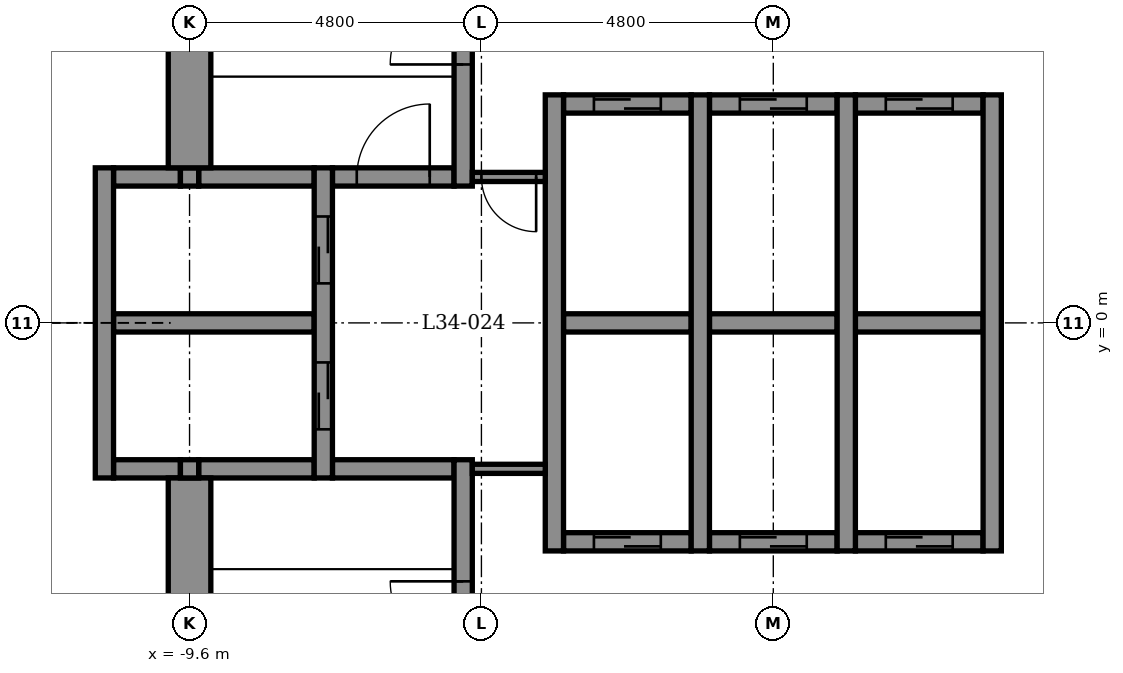
"""IFC4 building model, lengths in metres.
Left out: names, types, materials, properties, quantities, classifications, styles, units other than length and angle.
Written with IfcOpenShell. Run it as: python <this file> out.ifc"""

import sys

from ifc_helpers import new_model, si_unit, direction, frame, frame_2d, origin, place, context, subcontext, project, spatial, rectangle, extrude, element, fill, save


model = new_model("IFC4")
c1 = context("Model", 3, precision=1e-05, world=origin(), true_north=direction((0.0, 1.0)))
c2 = subcontext(c1, "Body", "Model", "MODEL_VIEW")
j1 = project(units=[si_unit("LENGTHUNIT", "METRE"), si_unit("PLANEANGLEUNIT", "RADIAN")], contexts=[c1])
p1 = place(None, origin())
s1 = spatial("IfcSite", under=j1, at=p1, CompositionType="ELEMENT")
p2 = place(p1, origin())
s2 = spatial("IfcBuilding", under=s1, at=p2, CompositionType="ELEMENT")
p3 = place(p2, frame((0.0, 0.0, 166.1)))
s3 = spatial("IfcBuildingStorey", under=s2, at=p3, CompositionType="ELEMENT", Elevation=166.1)
p4 = place(p3, frame((-3.45, -3.6, -0.15), z_axis=(0.0, 0.0, 1.0), x_axis=(1.0, 0.0, 0.0)))
e1 = element("IfcWall", 1, at=p4, inside=s3, PredefinedType="STANDARD", context=c2, shape_type="SweptSolid", body=[
    extrude(rectangle(XDim=2.1, YDim=0.3, at=frame_2d((1.05, 0.0))), origin(), (0.0, 0.0, 1.0), 3.9),
])
p5 = place(p4, frame((0.5, 0.0, 0.15)))
e2 = element("IfcOpeningElement", 2, at=p5, cuts=e1, PredefinedType="OPENING", context=c2, shape_type="SweptSolid", body=[
    extrude(rectangle(XDim=1.1, YDim=2.1, at=frame_2d((0.55, 1.05))), frame((0.0, 0.16, 0.0), z_axis=(0.0, -1.0, 0.0), x_axis=(1.0, 0.0, 0.0)), (0.0, 0.0, 1.0), 0.32),
])
p6 = place(p3, frame((-1.05, -3.6, -0.15), z_axis=(0.0, 0.0, 1.0), x_axis=(1.0, 0.0, 0.0)))
e3 = element("IfcWall", 3, at=p6, inside=s3, PredefinedType="STANDARD", context=c2, shape_type="SweptSolid", body=[
    extrude(rectangle(XDim=2.1, YDim=0.3, at=frame_2d((1.05, 0.0))), origin(), (0.0, 0.0, 1.0), 3.9),
])
p7 = place(p6, frame((0.5, 0.0, 0.15)))
e4 = element("IfcOpeningElement", 4, at=p7, cuts=e3, PredefinedType="OPENING", context=c2, shape_type="SweptSolid", body=[
    extrude(rectangle(XDim=1.1, YDim=2.1, at=frame_2d((0.55, 1.05))), frame((0.0, 0.16, 0.0), z_axis=(0.0, -1.0, 0.0), x_axis=(1.0, 0.0, 0.0)), (0.0, 0.0, 1.0), 0.32),
])
p8 = place(p3, frame((1.35, -3.6, -0.15), z_axis=(0.0, 0.0, 1.0), x_axis=(1.0, 0.0, 0.0)))
e5 = element("IfcWall", 5, at=p8, inside=s3, PredefinedType="STANDARD", context=c2, shape_type="SweptSolid", body=[
    extrude(rectangle(XDim=2.1, YDim=0.3, at=frame_2d((1.05, 0.0))), origin(), (0.0, 0.0, 1.0), 3.9),
])
p9 = place(p8, frame((0.5, 0.0, 0.15)))
e6 = element("IfcOpeningElement", 6, at=p9, cuts=e5, PredefinedType="OPENING", context=c2, shape_type="SweptSolid", body=[
    extrude(rectangle(XDim=1.1, YDim=2.1, at=frame_2d((0.55, 1.05))), frame((0.0, 0.16, 0.0), z_axis=(0.0, -1.0, 0.0), x_axis=(1.0, 0.0, 0.0)), (0.0, 0.0, 1.0), 0.32),
])
p10 = place(p3, frame((-10.85, -2.4, -0.15), z_axis=(0.0, 0.0, 1.0), x_axis=(1.0, 0.0, 0.0)))
e7 = element("IfcWall", 7, at=p10, inside=s3, PredefinedType="STANDARD", context=c2, shape_type="SweptSolid", body=[
    extrude(rectangle(XDim=1.1, YDim=0.3, at=frame_2d((0.55, 0.0))), origin(), (0.0, 0.0, 1.0), 3.9),
])
p11 = place(p3, frame((-9.45, -2.4, -0.15), z_axis=(0.0, 0.0, 1.0), x_axis=(1.0, 0.0, 0.0)))
e8 = element("IfcWall", 8, at=p11, inside=s3, PredefinedType="STANDARD", context=c2, shape_type="SweptSolid", body=[
    extrude(rectangle(XDim=1.9, YDim=0.3, at=frame_2d((0.95, 0.0))), origin(), (0.0, 0.0, 1.0), 3.9),
])
p12 = place(p3, frame((-7.25, -2.4, -0.15), z_axis=(0.0, 0.0, 1.0), x_axis=(1.0, 0.0, 0.0)))
e9 = element("IfcWall", 9, at=p12, inside=s3, PredefinedType="STANDARD", context=c2, shape_type="SweptSolid", body=[
    extrude(rectangle(XDim=2.0, YDim=0.3, at=frame_2d((1.0, 0.0))), origin(), (0.0, 0.0, 1.0), 3.9),
])
p13 = place(p3, frame((-10.85, 0.0, -0.15), z_axis=(0.0, 0.0, 1.0), x_axis=(1.0, 0.0, 0.0)))
e10 = element("IfcWall", 10, at=p13, inside=s3, PredefinedType="STANDARD", context=c2, shape_type="SweptSolid", body=[
    extrude(rectangle(XDim=3.3, YDim=0.3, at=frame_2d((1.65, 0.0))), origin(), (0.0, 0.0, 1.0), 3.9),
])
p14 = place(p3, frame((-3.45, 0.0, -0.15), z_axis=(0.0, 0.0, 1.0), x_axis=(1.0, 0.0, 0.0)))
e11 = element("IfcWall", 11, at=p14, inside=s3, PredefinedType="STANDARD", context=c2, shape_type="SweptSolid", body=[
    extrude(rectangle(XDim=2.1, YDim=0.3, at=frame_2d((1.05, 0.0))), origin(), (0.0, 0.0, 1.0), 3.9),
])
p15 = place(p3, frame((-1.05, 0.0, -0.15), z_axis=(0.0, 0.0, 1.0), x_axis=(1.0, 0.0, 0.0)))
e12 = element("IfcWall", 12, at=p15, inside=s3, PredefinedType="STANDARD", context=c2, shape_type="SweptSolid", body=[
    extrude(rectangle(XDim=2.1, YDim=0.3, at=frame_2d((1.05, 0.0))), origin(), (0.0, 0.0, 1.0), 3.9),
])
p16 = place(p3, frame((1.35, 0.0, -0.15), z_axis=(0.0, 0.0, 1.0), x_axis=(1.0, 0.0, 0.0)))
e13 = element("IfcWall", 13, at=p16, inside=s3, PredefinedType="STANDARD", context=c2, shape_type="SweptSolid", body=[
    extrude(rectangle(XDim=2.1, YDim=0.3, at=frame_2d((1.05, 0.0))), origin(), (0.0, 0.0, 1.0), 3.9),
])
p17 = place(p3, frame((-10.85, 2.4, -0.15), z_axis=(0.0, 0.0, 1.0), x_axis=(1.0, 0.0, 0.0)))
e14 = element("IfcWall", 14, at=p17, inside=s3, PredefinedType="STANDARD", context=c2, shape_type="SweptSolid", body=[
    extrude(rectangle(XDim=1.1, YDim=0.3, at=frame_2d((0.55, 0.0))), origin(), (0.0, 0.0, 1.0), 3.9),
])
p18 = place(p3, frame((-9.45, 2.4, -0.15), z_axis=(0.0, 0.0, 1.0), x_axis=(1.0, 0.0, 0.0)))
e15 = element("IfcWall", 15, at=p18, inside=s3, PredefinedType="STANDARD", context=c2, shape_type="SweptSolid", body=[
    extrude(rectangle(XDim=1.9, YDim=0.3, at=frame_2d((0.95, 0.0))), origin(), (0.0, 0.0, 1.0), 3.9),
])
p19 = place(p3, frame((-7.25, 2.4, -0.15), z_axis=(0.0, 0.0, 1.0), x_axis=(1.0, 0.0, 0.0)))
e16 = element("IfcWall", 16, at=p19, inside=s3, PredefinedType="STANDARD", context=c2, shape_type="SweptSolid", body=[
    extrude(rectangle(XDim=2.0, YDim=0.3, at=frame_2d((1.0, 0.0))), origin(), (0.0, 0.0, 1.0), 3.9),
])
p20 = place(p19, frame((0.4, 0.0, 0.15)))
e17 = element("IfcOpeningElement", 17, at=p20, cuts=e16, PredefinedType="OPENING", context=c2, shape_type="SweptSolid", body=[
    extrude(rectangle(XDim=1.2, YDim=2.1, at=frame_2d((0.6, 1.05))), frame((0.0, 0.16, 0.0), z_axis=(0.0, -1.0, 0.0), x_axis=(1.0, 0.0, 0.0)), (0.0, 0.0, 1.0), 0.32),
])
p21 = place(p3, frame((-3.45, 3.6, -0.15), z_axis=(0.0, 0.0, 1.0), x_axis=(1.0, 0.0, 0.0)))
e18 = element("IfcWall", 18, at=p21, inside=s3, PredefinedType="STANDARD", context=c2, shape_type="SweptSolid", body=[
    extrude(rectangle(XDim=2.1, YDim=0.3, at=frame_2d((1.05, 0.0))), origin(), (0.0, 0.0, 1.0), 3.9),
])
p22 = place(p21, frame((0.5, 0.0, 0.15)))
e19 = element("IfcOpeningElement", 19, at=p22, cuts=e18, PredefinedType="OPENING", context=c2, shape_type="SweptSolid", body=[
    extrude(rectangle(XDim=1.1, YDim=2.1, at=frame_2d((0.55, 1.05))), frame((0.0, 0.16, 0.0), z_axis=(0.0, -1.0, 0.0), x_axis=(1.0, 0.0, 0.0)), (0.0, 0.0, 1.0), 0.32),
])
p23 = place(p3, frame((-1.05, 3.6, -0.15), z_axis=(0.0, 0.0, 1.0), x_axis=(1.0, 0.0, 0.0)))
e20 = element("IfcWall", 20, at=p23, inside=s3, PredefinedType="STANDARD", context=c2, shape_type="SweptSolid", body=[
    extrude(rectangle(XDim=2.1, YDim=0.3, at=frame_2d((1.05, 0.0))), origin(), (0.0, 0.0, 1.0), 3.9),
])
p24 = place(p23, frame((0.5, 0.0, 0.15)))
e21 = element("IfcOpeningElement", 21, at=p24, cuts=e20, PredefinedType="OPENING", context=c2, shape_type="SweptSolid", body=[
    extrude(rectangle(XDim=1.1, YDim=2.1, at=frame_2d((0.55, 1.05))), frame((0.0, 0.16, 0.0), z_axis=(0.0, -1.0, 0.0), x_axis=(1.0, 0.0, 0.0)), (0.0, 0.0, 1.0), 0.32),
])
p25 = place(p3, frame((1.35, 3.6, -0.15), z_axis=(0.0, 0.0, 1.0), x_axis=(1.0, 0.0, 0.0)))
e22 = element("IfcWall", 22, at=p25, inside=s3, PredefinedType="STANDARD", context=c2, shape_type="SweptSolid", body=[
    extrude(rectangle(XDim=2.1, YDim=0.3, at=frame_2d((1.05, 0.0))), origin(), (0.0, 0.0, 1.0), 3.9),
])
p26 = place(p25, frame((0.5, 0.0, 0.15)))
e23 = element("IfcOpeningElement", 23, at=p26, cuts=e22, PredefinedType="OPENING", context=c2, shape_type="SweptSolid", body=[
    extrude(rectangle(XDim=1.1, YDim=2.1, at=frame_2d((0.55, 1.05))), frame((0.0, 0.16, 0.0), z_axis=(0.0, -1.0, 0.0), x_axis=(1.0, 0.0, 0.0)), (0.0, 0.0, 1.0), 0.32),
])
p27 = place(p3, frame((-11.0, -2.55, -0.15), z_axis=(0.0, 0.0, 1.0), x_axis=(0.0, 1.0, 0.0)))
e24 = element("IfcWall", 24, at=p27, inside=s3, PredefinedType="STANDARD", context=c2, shape_type="SweptSolid", body=[
    extrude(rectangle(XDim=5.1, YDim=0.3, at=frame_2d((2.55, 0.0))), origin(), (0.0, 0.0, 1.0), 3.9),
])
p28 = place(p3, frame((-9.6, -10.15, -0.15), z_axis=(0.0, 0.0, 1.0), x_axis=(0.0, 1.0, 0.0)))
e25 = element("IfcWall", 25, at=p28, inside=s3, PredefinedType="SHEAR", context=c2, shape_type="SweptSolid", body=[
    extrude(rectangle(XDim=7.6, YDim=0.7, at=frame_2d((3.8, 0.0))), origin(), (0.0, 0.0, 1.0), 3.9),
])
for number, where, z_axis, x_axis in (
    (26, (-9.6, -2.55, -0.15), (0.0, 0.0, 1.0), (0.0, 1.0, 0.0)),
    (27, (-9.6, 2.25, -0.15), (0.0, 0.0, 1.0), (0.0, 1.0, 0.0)),
):
    element("IfcWall", number, at=place(p3, frame(where, z_axis=z_axis, x_axis=x_axis)), inside=s3, PredefinedType="STANDARD", context=c2, shape_type="SweptSolid", body=[
        extrude(rectangle(XDim=0.3, YDim=0.3, at=frame_2d((0.15, 0.0))), origin(), (0.0, 0.0, 1.0), 3.9),
    ])
p29 = place(p3, frame((-9.6, 2.55, -0.15), z_axis=(0.0, 0.0, 1.0), x_axis=(0.0, 1.0, 0.0)))
e28 = element("IfcWall", 28, at=p29, inside=s3, PredefinedType="SHEAR", context=c2, shape_type="SweptSolid", body=[
    extrude(rectangle(XDim=7.6, YDim=0.7, at=frame_2d((3.8, 0.0))), origin(), (0.0, 0.0, 1.0), 3.9),
])
p30 = place(p3, frame((-7.4, -2.55, -0.15), z_axis=(0.0, 0.0, 1.0), x_axis=(0.0, 1.0, 0.0)))
e29 = element("IfcWall", 29, at=p30, inside=s3, PredefinedType="STANDARD", context=c2, shape_type="SweptSolid", body=[
    extrude(rectangle(XDim=5.1, YDim=0.3, at=frame_2d((2.55, 0.0))), origin(), (0.0, 0.0, 1.0), 3.9),
])
p31 = place(p30, frame((0.8, 0.0, 0.15)))
e30 = element("IfcOpeningElement", 30, at=p31, cuts=e29, PredefinedType="OPENING", context=c2, shape_type="SweptSolid", body=[
    extrude(rectangle(XDim=1.1, YDim=2.1, at=frame_2d((0.55, 1.05))), frame((0.0, 0.16, 0.0), z_axis=(0.0, -1.0, 0.0), x_axis=(1.0, 0.0, 0.0)), (0.0, 0.0, 1.0), 0.32),
])
p32 = place(p30, frame((3.2, 0.0, 0.15)))
e31 = element("IfcOpeningElement", 31, at=p32, cuts=e29, PredefinedType="OPENING", context=c2, shape_type="SweptSolid", body=[
    extrude(rectangle(XDim=1.1, YDim=2.1, at=frame_2d((0.55, 1.05))), frame((0.0, 0.16, 0.0), z_axis=(0.0, -1.0, 0.0), x_axis=(1.0, 0.0, 0.0)), (0.0, 0.0, 1.0), 0.32),
])
p33 = place(p3, frame((-5.1, -9.25, -0.15), z_axis=(0.0, 0.0, 1.0), x_axis=(0.0, 1.0, 0.0)))
e32 = element("IfcWall", 32, at=p33, inside=s3, PredefinedType="STANDARD", context=c2, shape_type="SweptSolid", body=[
    extrude(rectangle(XDim=7.0, YDim=0.3, at=frame_2d((3.5, 0.0))), origin(), (0.0, 0.0, 1.0), 3.9),
])
p34 = place(p33, frame((3.8, 0.0, 0.15)))
e33 = element("IfcOpeningElement", 33, at=p34, cuts=e32, PredefinedType="OPENING", context=c2, shape_type="SweptSolid", body=[
    extrude(rectangle(XDim=1.2, YDim=2.1, at=frame_2d((0.6, 1.05))), frame((0.0, 0.16, 0.0), z_axis=(0.0, -1.0, 0.0), x_axis=(1.0, 0.0, 0.0)), (0.0, 0.0, 1.0), 0.32),
])
p35 = place(p3, frame((-5.1, 2.25, -0.15), z_axis=(0.0, 0.0, 1.0), x_axis=(0.0, 1.0, 0.0)))
e34 = element("IfcWall", 34, at=p35, inside=s3, PredefinedType="STANDARD", context=c2, shape_type="SweptSolid", body=[
    extrude(rectangle(XDim=7.0, YDim=0.3, at=frame_2d((3.5, 0.0))), origin(), (0.0, 0.0, 1.0), 3.9),
])
p36 = place(p35, frame((2.0, 0.0, 0.15)))
e35 = element("IfcOpeningElement", 35, at=p36, cuts=e34, PredefinedType="OPENING", context=c2, shape_type="SweptSolid", body=[
    extrude(rectangle(XDim=1.2, YDim=2.1, at=frame_2d((0.6, 1.05))), frame((0.0, 0.16, 0.0), z_axis=(0.0, -1.0, 0.0), x_axis=(1.0, 0.0, 0.0)), (0.0, 0.0, 1.0), 0.32),
])
for number, where, z_axis, x_axis in (
    (36, (-3.6, -3.75, -0.15), (0.0, 0.0, 1.0), (0.0, 1.0, 0.0)),
    (37, (-1.2, -3.75, -0.15), (0.0, 0.0, 1.0), (0.0, 1.0, 0.0)),
    (38, (1.2, -3.75, -0.15), (0.0, 0.0, 1.0), (0.0, 1.0, 0.0)),
    (39, (3.6, -3.75, -0.15), (0.0, 0.0, 1.0), (0.0, 1.0, 0.0)),
):
    element("IfcWall", number, at=place(p3, frame(where, z_axis=z_axis, x_axis=x_axis)), inside=s3, PredefinedType="STANDARD", context=c2, shape_type="SweptSolid", body=[
        extrude(rectangle(XDim=7.5, YDim=0.3, at=frame_2d((3.75, 0.0))), origin(), (0.0, 0.0, 1.0), 3.9),
    ])
p37 = place(p3, frame((-4.95, 2.4, 0.0), z_axis=(0.0, 0.0, 1.0), x_axis=(1.0, 0.0, 0.0)))
e40 = element("IfcWall", 40, at=p37, inside=s3, PredefinedType="PARTITIONING", context=c2, shape_type="SweptSolid", body=[
    extrude(rectangle(XDim=1.2, YDim=0.15, at=frame_2d((0.6, 0.0))), origin(), (0.0, 0.0, 1.0), 3.75),
])
p38 = place(p37, frame((0.15, 0.0, 0.0)))
e41 = element("IfcOpeningElement", 41, at=p38, cuts=e40, PredefinedType="OPENING", context=c2, shape_type="SweptSolid", body=[
    extrude(rectangle(XDim=0.9, YDim=2.1, at=frame_2d((0.45, 1.05))), frame((0.0, 0.085, 0.0), z_axis=(0.0, -1.0, 0.0), x_axis=(1.0, 0.0, 0.0)), (0.0, 0.0, 1.0), 0.17),
])
p39 = place(p3, frame((-4.95, -2.4, 0.0), z_axis=(0.0, 0.0, 1.0), x_axis=(1.0, 0.0, 0.0)))
e42 = element("IfcWall", 42, at=p39, inside=s3, PredefinedType="PARTITIONING", context=c2, shape_type="SweptSolid", body=[
    extrude(rectangle(XDim=1.2, YDim=0.15, at=frame_2d((0.6, 0.0))), origin(), (0.0, 0.0, 1.0), 3.75),
])
p40 = place(p31, origin())
e43 = element("IfcDoor", 43, at=p40, inside=s3, OperationType="DOUBLE_DOOR_SLIDING", PredefinedType="DOOR", context=c2, shape_type="SweptSolid", body=[
    extrude(rectangle(XDim=1.1, YDim=2.1, at=frame_2d((0.55, 1.05))), frame((0.0, 0.025, 0.0), z_axis=(0.0, -1.0, 0.0), x_axis=(1.0, 0.0, 0.0)), (0.0, 0.0, 1.0), 0.05),
])
fill(e30, e43)
p41 = place(p32, origin())
e44 = element("IfcDoor", 44, at=p41, inside=s3, OperationType="DOUBLE_DOOR_SLIDING", PredefinedType="DOOR", context=c2, shape_type="SweptSolid", body=[
    extrude(rectangle(XDim=1.1, YDim=2.1, at=frame_2d((0.55, 1.05))), frame((0.0, 0.025, 0.0), z_axis=(0.0, -1.0, 0.0), x_axis=(1.0, 0.0, 0.0)), (0.0, 0.0, 1.0), 0.05),
])
fill(e31, e44)
p42 = place(p22, origin())
e45 = element("IfcDoor", 45, at=p42, inside=s3, OperationType="DOUBLE_DOOR_SLIDING", PredefinedType="DOOR", context=c2, shape_type="SweptSolid", body=[
    extrude(rectangle(XDim=1.1, YDim=2.1, at=frame_2d((0.55, 1.05))), frame((0.0, 0.025, 0.0), z_axis=(0.0, -1.0, 0.0), x_axis=(1.0, 0.0, 0.0)), (0.0, 0.0, 1.0), 0.05),
])
fill(e19, e45)
p43 = place(p24, origin())
e46 = element("IfcDoor", 46, at=p43, inside=s3, OperationType="DOUBLE_DOOR_SLIDING", PredefinedType="DOOR", context=c2, shape_type="SweptSolid", body=[
    extrude(rectangle(XDim=1.1, YDim=2.1, at=frame_2d((0.55, 1.05))), frame((0.0, 0.025, 0.0), z_axis=(0.0, -1.0, 0.0), x_axis=(1.0, 0.0, 0.0)), (0.0, 0.0, 1.0), 0.05),
])
fill(e21, e46)
p44 = place(p26, origin())
e47 = element("IfcDoor", 47, at=p44, inside=s3, OperationType="DOUBLE_DOOR_SLIDING", PredefinedType="DOOR", context=c2, shape_type="SweptSolid", body=[
    extrude(rectangle(XDim=1.1, YDim=2.1, at=frame_2d((0.55, 1.05))), frame((0.0, 0.025, 0.0), z_axis=(0.0, -1.0, 0.0), x_axis=(1.0, 0.0, 0.0)), (0.0, 0.0, 1.0), 0.05),
])
fill(e23, e47)
p45 = place(p5, origin())
e48 = element("IfcDoor", 48, at=p45, inside=s3, OperationType="DOUBLE_DOOR_SLIDING", PredefinedType="DOOR", context=c2, shape_type="SweptSolid", body=[
    extrude(rectangle(XDim=1.1, YDim=2.1, at=frame_2d((0.55, 1.05))), frame((0.0, 0.025, 0.0), z_axis=(0.0, -1.0, 0.0), x_axis=(1.0, 0.0, 0.0)), (0.0, 0.0, 1.0), 0.05),
])
fill(e2, e48)
p46 = place(p7, origin())
e49 = element("IfcDoor", 49, at=p46, inside=s3, OperationType="DOUBLE_DOOR_SLIDING", PredefinedType="DOOR", context=c2, shape_type="SweptSolid", body=[
    extrude(rectangle(XDim=1.1, YDim=2.1, at=frame_2d((0.55, 1.05))), frame((0.0, 0.025, 0.0), z_axis=(0.0, -1.0, 0.0), x_axis=(1.0, 0.0, 0.0)), (0.0, 0.0, 1.0), 0.05),
])
fill(e4, e49)
p47 = place(p9, origin())
e50 = element("IfcDoor", 50, at=p47, inside=s3, OperationType="DOUBLE_DOOR_SLIDING", PredefinedType="DOOR", context=c2, shape_type="SweptSolid", body=[
    extrude(rectangle(XDim=1.1, YDim=2.1, at=frame_2d((0.55, 1.05))), frame((0.0, 0.025, 0.0), z_axis=(0.0, -1.0, 0.0), x_axis=(1.0, 0.0, 0.0)), (0.0, 0.0, 1.0), 0.05),
])
fill(e6, e50)
p48 = place(p36, origin())
e51 = element("IfcDoor", 51, at=p48, inside=s3, OperationType="SINGLE_SWING_LEFT", PredefinedType="DOOR", context=c2, shape_type="SweptSolid", body=[
    extrude(rectangle(XDim=1.2, YDim=2.1, at=frame_2d((0.6, 1.05))), frame((0.0, 0.025, 0.0), z_axis=(0.0, -1.0, 0.0), x_axis=(1.0, 0.0, 0.0)), (0.0, 0.0, 1.0), 0.05),
])
fill(e35, e51)
p49 = place(p34, origin())
e52 = element("IfcDoor", 52, at=p49, inside=s3, OperationType="SINGLE_SWING_RIGHT", PredefinedType="DOOR", context=c2, shape_type="SweptSolid", body=[
    extrude(rectangle(XDim=1.2, YDim=2.1, at=frame_2d((0.6, 1.05))), frame((0.0, 0.025, 0.0), z_axis=(0.0, -1.0, 0.0), x_axis=(1.0, 0.0, 0.0)), (0.0, 0.0, 1.0), 0.05),
])
fill(e33, e52)
p50 = place(p38, frame((0.9, 0.0, 0.0), z_axis=(0.0, 0.0, 1.0), x_axis=(-1.0, 0.0, 0.0)))
e53 = element("IfcDoor", 53, at=p50, inside=s3, OperationType="SINGLE_SWING_RIGHT", PredefinedType="DOOR", context=c2, shape_type="SweptSolid", body=[
    extrude(rectangle(XDim=0.9, YDim=2.1, at=frame_2d((0.45, 1.05))), frame((0.0, 0.025, 0.0), z_axis=(0.0, -1.0, 0.0), x_axis=(1.0, 0.0, 0.0)), (0.0, 0.0, 1.0), 0.05),
])
fill(e41, e53)
p51 = place(p20, origin())
e54 = element("IfcDoor", 54, at=p51, inside=s3, OperationType="SINGLE_SWING_RIGHT", PredefinedType="DOOR", context=c2, shape_type="SweptSolid", body=[
    extrude(rectangle(XDim=1.2, YDim=2.1, at=frame_2d((0.6, 1.05))), frame((0.0, 0.025, 0.0), z_axis=(0.0, -1.0, 0.0), x_axis=(1.0, 0.0, 0.0)), (0.0, 0.0, 1.0), 0.05),
])
fill(e17, e54)
save(model, sys.argv[1])
